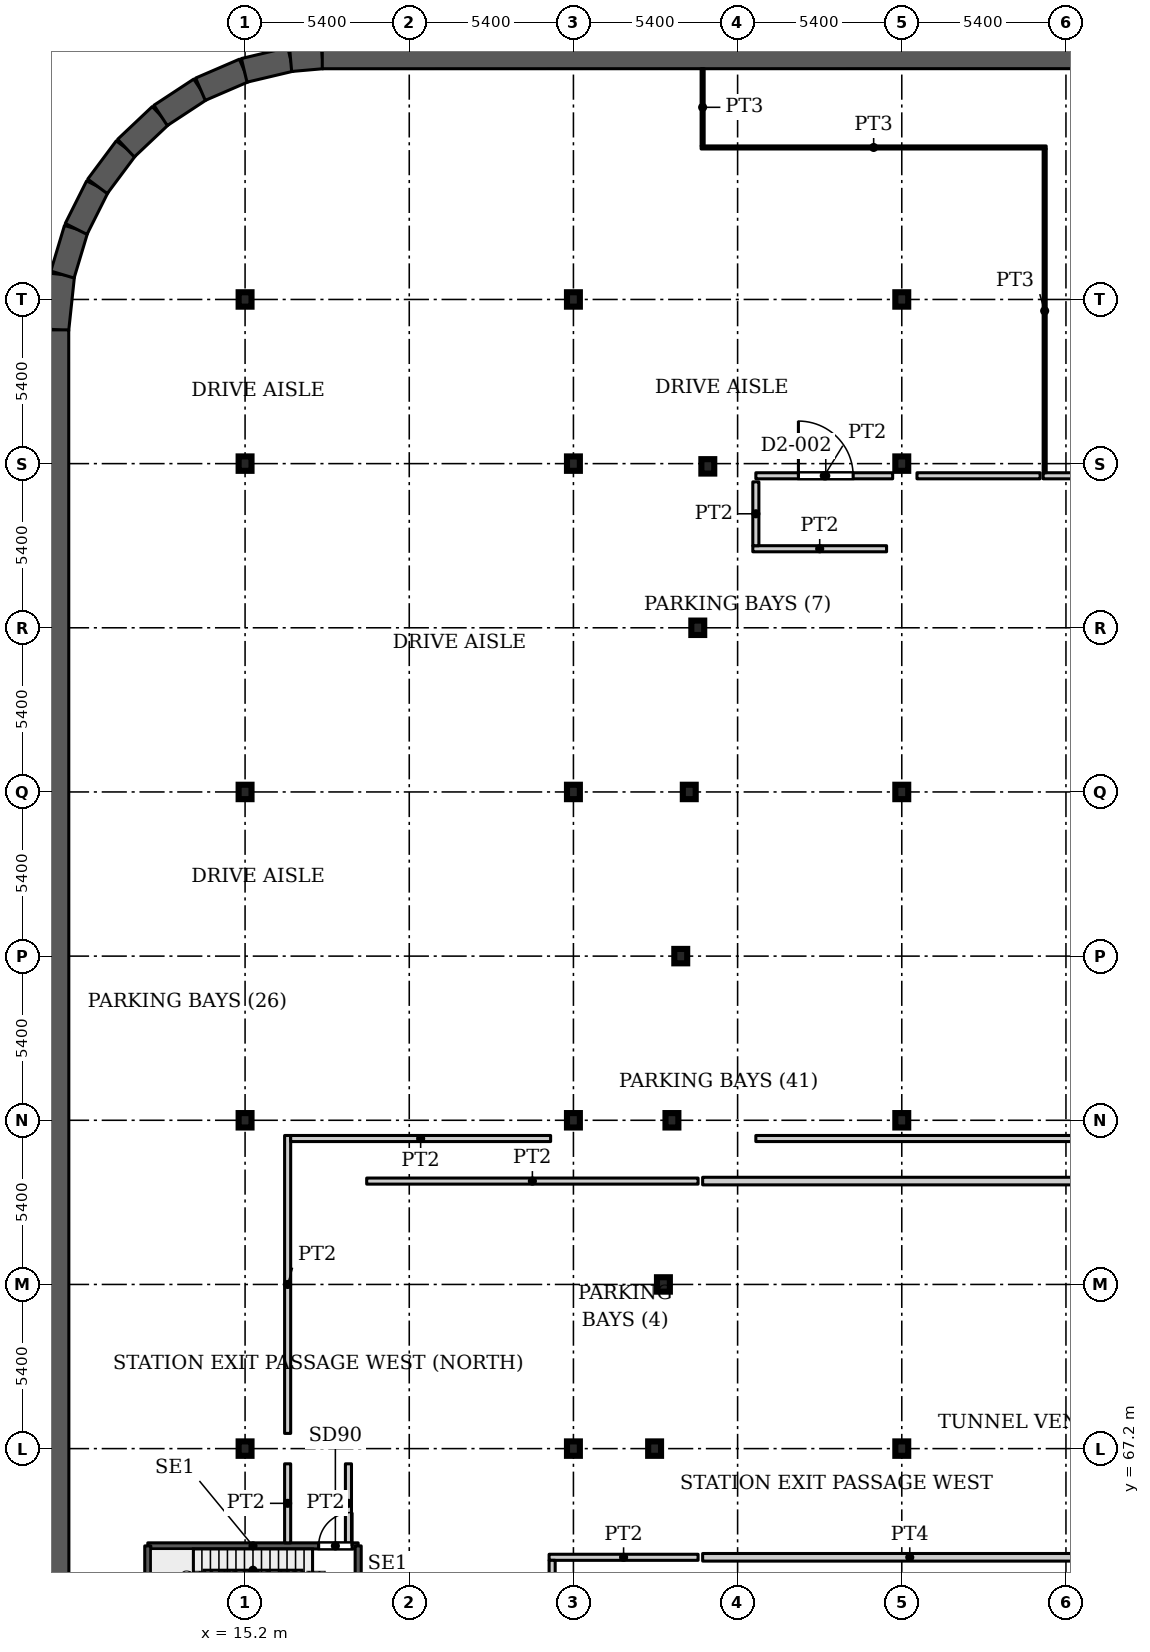
"""IFC4 building model, lengths in metres.
Left out: names, types, materials, properties, quantities, classifications, styles, units other than length and angle.
Written with IfcOpenShell. Run it as: python <this file> out.ifc"""

import sys

from ifc_helpers import new_model, si_unit, direction, frame, frame_2d, origin, origin_2d, place, context, subcontext, project, spatial, rectangle, i_section, extrude, source, transform, mapped, element, fill, save


model = new_model("IFC4")
c1 = context("Model", 3, precision=1e-05, world=origin(), true_north=direction((0.0, 1.0)))
c2 = subcontext(c1, "Body", "Model", "MODEL_VIEW")
j1 = project(units=[si_unit("LENGTHUNIT", "METRE"), si_unit("PLANEANGLEUNIT", "RADIAN")], contexts=[c1])
p1 = place(None, origin())
s1 = spatial("IfcSite", under=j1, at=p1, CompositionType="ELEMENT")
p2 = place(p1, origin())
s2 = spatial("IfcBuilding", under=s1, at=p2, CompositionType="ELEMENT")
p3 = place(p2, frame((0.0, 0.0, -10.0)))
s3 = spatial("IfcBuildingStorey", under=s2, at=p3, CompositionType="ELEMENT", Elevation=-10.0)
for number, where, z_axis, x_axis in (
    (1, (15.2, 67.2, 0.0), (0.0, 0.0, 1.0), (1.0, 0.0, 0.0)),
    (2, (26.0, 67.2, 0.0), (0.0, 0.0, 1.0), (1.0, 0.0, 0.0)),
    (3, (36.8, 67.2, 0.0), (0.0, 0.0, 1.0), (1.0, 0.0, 0.0)),
    (4, (15.2, 78.0, 0.0), (0.0, 0.0, 1.0), (1.0, 0.0, 0.0)),
    (5, (26.0, 78.0, 0.0), (0.0, 0.0, 1.0), (1.0, 0.0, 0.0)),
    (6, (36.8, 78.0, 0.0), (0.0, 0.0, 1.0), (1.0, 0.0, 0.0)),
    (7, (15.2, 88.8, 0.0), (0.0, 0.0, 1.0), (1.0, 0.0, 0.0)),
    (8, (26.0, 88.8, 0.0), (0.0, 0.0, 1.0), (1.0, 0.0, 0.0)),
    (9, (36.8, 88.8, 0.0), (0.0, 0.0, 1.0), (1.0, 0.0, 0.0)),
    (10, (15.2, 99.6, 0.0), (0.0, 0.0, 1.0), (1.0, 0.0, 0.0)),
    (11, (26.0, 99.6, 0.0), (0.0, 0.0, 1.0), (1.0, 0.0, 0.0)),
    (12, (36.8, 99.6, 0.0), (0.0, 0.0, 1.0), (1.0, 0.0, 0.0)),
    (13, (15.2, 105.0, 0.0), (0.0, 0.0, 1.0), (1.0, 0.0, 0.0)),
    (14, (26.0, 105.0, 0.0), (0.0, 0.0, 1.0), (1.0, 0.0, 0.0)),
    (15, (36.8, 105.0, 0.0), (0.0, 0.0, 1.0), (1.0, 0.0, 0.0)),
    (16, (28.67, 67.2, 0.0), (0.0, 0.0, 1.0), (1.0, 0.0, 0.0)),
    (17, (28.96, 72.6, 0.0), (0.0, 0.0, 1.0), (1.0, 0.0, 0.0)),
    (18, (29.24, 78.0, 0.0), (0.0, 0.0, 1.0), (1.0, 0.0, 0.0)),
    (19, (29.53, 83.4, 0.0), (0.0, 0.0, 1.0), (1.0, 0.0, 0.0)),
    (20, (29.81, 88.8, 0.0), (0.0, 0.0, 1.0), (1.0, 0.0, 0.0)),
    (21, (30.09, 94.2, 0.0), (0.0, 0.0, 1.0), (1.0, 0.0, 0.0)),
    (22, (30.42, 99.51, 0.0), (0.0, 0.0, 1.0), (1.0, 0.0, 0.0)),
):
    element("IfcColumn", number, at=place(p3, frame(where, z_axis=z_axis, x_axis=x_axis)), inside=s3, PredefinedType="COLUMN", context=c2, shape_type="SweptSolid", body=[
        extrude(i_section(OverallWidth=0.424, OverallDepth=0.474, WebThickness=0.048, FlangeThickness=0.077, FilletRadius=0.014, at=origin_2d()), origin(), (0.0, 0.0, 1.0), 5.0),
    ])
p4 = place(p3, frame((9.0, 104.0, 0.0), z_axis=(0.0, 0.0, 1.0), x_axis=(0.105567043429, 0.994412187849, 0.0)))
e23 = element("IfcWall", 23, at=p4, inside=s3, PredefinedType="SOLIDWALL", context=c2, shape_type="SweptSolid", body=[
    extrude(rectangle(XDim=1.829, YDim=0.8, at=frame_2d((0.915, 0.0))), origin(), (0.0, 0.0, 1.0), 5.0),
])
p5 = place(p3, frame((9.193, 105.819, 0.0), z_axis=(0.0, 0.0, 1.0), x_axis=(0.287147763375, 0.957886299092, 0.0)))
e24 = element("IfcWall", 24, at=p5, inside=s3, PredefinedType="SOLIDWALL", context=c2, shape_type="SweptSolid", body=[
    extrude(rectangle(XDim=1.567, YDim=0.8, at=frame_2d((0.783, 0.0))), origin(), (0.0, 0.0, 1.0), 5.0),
])
p6 = place(p3, frame((9.643, 107.32, 0.0), z_axis=(0.0, 0.0, 1.0), x_axis=(0.448459314462, 0.893803246399, 0.0)))
e25 = element("IfcWall", 25, at=p6, inside=s3, PredefinedType="SOLIDWALL", context=c2, shape_type="SweptSolid", body=[
    extrude(rectangle(XDim=1.567, YDim=0.8, at=frame_2d((0.784, 0.0))), origin(), (0.0, 0.0, 1.0), 5.0),
])
p7 = place(p3, frame((10.346, 108.721, 0.0), z_axis=(0.0, 0.0, 1.0), x_axis=(0.597630520512, 0.801771638905, 0.0)))
e26 = element("IfcWall", 26, at=p7, inside=s3, PredefinedType="SOLIDWALL", context=c2, shape_type="SweptSolid", body=[
    extrude(rectangle(XDim=1.568, YDim=0.8, at=frame_2d((0.784, 0.0))), origin(), (0.0, 0.0, 1.0), 5.0),
])
p8 = place(p3, frame((11.283, 109.978, 0.0), z_axis=(0.0, 0.0, 1.0), x_axis=(0.726995868662, 0.686641833089, 0.0)))
e27 = element("IfcWall", 27, at=p8, inside=s3, PredefinedType="SOLIDWALL", context=c2, shape_type="SweptSolid", body=[
    extrude(rectangle(XDim=1.567, YDim=0.8, at=frame_2d((0.783, 0.0))), origin(), (0.0, 0.0, 1.0), 5.0),
])
p9 = place(p3, frame((12.422, 111.054, 0.0), z_axis=(0.0, 0.0, 1.0), x_axis=(0.835603348101, 0.549333272834, 0.0)))
e28 = element("IfcWall", 28, at=p9, inside=s3, PredefinedType="SOLIDWALL", context=c2, shape_type="SweptSolid", body=[
    extrude(rectangle(XDim=1.568, YDim=0.8, at=frame_2d((0.784, 0.0))), origin(), (0.0, 0.0, 1.0), 5.0),
])
p10 = place(p3, frame((13.732, 111.915, 0.0), z_axis=(0.0, 0.0, 1.0), x_axis=(0.918183437355, 0.396155493925, 0.0)))
e29 = element("IfcWall", 29, at=p10, inside=s3, PredefinedType="SOLIDWALL", context=c2, shape_type="SweptSolid", body=[
    extrude(rectangle(XDim=1.567, YDim=0.8, at=frame_2d((0.784, 0.0))), origin(), (0.0, 0.0, 1.0), 5.0),
])
p11 = place(p3, frame((15.171, 112.536, 0.0), z_axis=(0.0, 0.0, 1.0), x_axis=(0.972992949439, 0.230834833469, 0.0)))
e30 = element("IfcWall", 30, at=p11, inside=s3, PredefinedType="SOLIDWALL", context=c2, shape_type="SweptSolid", body=[
    extrude(rectangle(XDim=1.569, YDim=0.8, at=frame_2d((0.784, 0.0))), origin(), (0.0, 0.0, 1.0), 5.0),
])
p12 = place(p3, frame((16.697, 112.898, 0.0), z_axis=(0.0, 0.0, 1.0), x_axis=(0.996202832813, 0.087062712427, 0.0)))
e31 = element("IfcWall", 31, at=p12, inside=s3, PredefinedType="SOLIDWALL", context=c2, shape_type="SweptSolid", body=[
    extrude(rectangle(XDim=1.046, YDim=0.8, at=frame_2d((0.523, 0.0))), origin(), (0.0, 0.0, 1.0), 5.0),
])
p13 = place(p3, frame((17.739, 112.989, 0.0), z_axis=(0.0, 0.0, 1.0), x_axis=(0.999999994851, 0.000101480029, 0.0)))
e32 = element("IfcWall", 32, at=p13, inside=s3, PredefinedType="SOLIDWALL", context=c2, shape_type="SweptSolid", body=[
    extrude(rectangle(XDim=108.261, YDim=0.8, at=frame_2d((54.13, 0.0))), origin(), (0.0, 0.0, 1.0), 5.0),
])
p14 = place(p3, frame((9.011, 15.739, 0.0), z_axis=(0.0, 0.0, 1.0), x_axis=(-0.000124475473, 0.999999992253, 0.0)))
e33 = element("IfcWall", 33, at=p14, inside=s3, PredefinedType="SOLIDWALL", context=c2, shape_type="SweptSolid", body=[
    extrude(rectangle(XDim=88.261, YDim=0.8, at=frame_2d((44.13, 0.0))), origin(), (0.0, 0.0, 1.0), 5.0),
])
p15 = place(p3, frame((12.0, 64.0, 0.0), z_axis=(0.0, 0.0, 1.0), x_axis=(1.0, 0.0, 0.0)))
e34 = element("IfcWall", 34, at=p15, inside=s3, PredefinedType="SHEAR", context=c2, shape_type="SweptSolid", body=[
    extrude(rectangle(XDim=6.92, YDim=0.2, at=frame_2d((3.46, 0.0))), origin(), (0.0, 0.0, 1.0), 5.0),
])
p16 = place(p15, frame((5.62, 0.0, 0.0)))
e35 = element("IfcOpeningElement", 35, at=p16, cuts=e34, PredefinedType="OPENING", context=c2, shape_type="SweptSolid", body=[
    extrude(rectangle(XDim=1.1, YDim=2.2, at=frame_2d((0.55, 1.1))), frame((0.0, 0.11, 0.0), z_axis=(0.0, -1.0, 0.0), x_axis=(1.0, 0.0, 0.0)), (0.0, 0.0, 1.0), 0.22),
])
for number, where, z_axis, x_axis in (
    (36, (12.0, 60.85, 0.0), (0.0, 0.0, 1.0), (0.0, 1.0, 0.0)),
    (37, (18.92, 60.85, 0.0), (0.0, 0.0, 1.0), (0.0, 1.0, 0.0)),
):
    element("IfcWall", number, at=place(p3, frame(where, z_axis=z_axis, x_axis=x_axis)), inside=s3, PredefinedType="SHEAR", context=c2, shape_type="SweptSolid", body=[
        extrude(rectangle(XDim=3.15, YDim=0.2, at=frame_2d((1.575, 0.0))), origin(), (0.0, 0.0, 1.0), 5.0),
    ])
p17 = place(p3, frame((16.6, 64.1, 0.0), z_axis=(0.0, 0.0, 1.0), x_axis=(0.0, 1.0, 0.0)))
e38 = element("IfcWall", 38, at=p17, inside=s3, PredefinedType="PARTITIONING", context=c2, shape_type="SweptSolid", body=[
    extrude(rectangle(XDim=2.6, YDim=0.2, at=frame_2d((1.3, 0.0))), origin(), (0.0, 0.0, 1.0), 4.58),
])
p18 = place(p3, frame((16.6, 67.7, 0.0), z_axis=(0.0, 0.0, 1.0), x_axis=(0.0, 1.0, 0.0)))
e39 = element("IfcWall", 39, at=p18, inside=s3, PredefinedType="PARTITIONING", context=c2, shape_type="SweptSolid", body=[
    extrude(rectangle(XDim=9.8, YDim=0.2, at=frame_2d((4.9, 0.0))), origin(), (0.0, 0.0, 1.0), 4.58),
])
p19 = place(p3, frame((16.7, 77.4, 0.0), z_axis=(0.0, 0.0, 1.0), x_axis=(1.0, 0.0, 0.0)))
e40 = element("IfcWall", 40, at=p19, inside=s3, PredefinedType="PARTITIONING", context=c2, shape_type="SweptSolid", body=[
    extrude(rectangle(XDim=8.55, YDim=0.2, at=frame_2d((4.275, 0.0))), origin(), (0.0, 0.0, 1.0), 4.58),
])
p20 = place(p3, frame((18.6, 64.1, 0.0), z_axis=(0.0, 0.0, 1.0), x_axis=(0.0, 1.0, 0.0)))
e41 = element("IfcWall", 41, at=p20, inside=s3, PredefinedType="PARTITIONING", context=c2, shape_type="SweptSolid", body=[
    extrude(rectangle(XDim=2.6, YDim=0.2, at=frame_2d((1.3, 0.0))), origin(), (0.0, 0.0, 1.0), 4.58),
])
p21 = place(p3, frame((19.2, 76.0, 0.0), z_axis=(0.0, 0.0, 1.0), x_axis=(1.0, 0.0, 0.0)))
e42 = element("IfcWall", 42, at=p21, inside=s3, PredefinedType="PARTITIONING", context=c2, shape_type="SweptSolid", body=[
    extrude(rectangle(XDim=10.9, YDim=0.2, at=frame_2d((5.45, 0.0))), origin(), (0.0, 0.0, 1.0), 4.58),
])
p22 = place(p3, frame((25.2, 63.625, 0.0), z_axis=(0.0, 0.0, 1.0), x_axis=(1.0, 0.0, 0.0)))
e43 = element("IfcWall", 43, at=p22, inside=s3, PredefinedType="PARTITIONING", context=c2, shape_type="SweptSolid", body=[
    extrude(rectangle(XDim=4.9, YDim=0.2, at=frame_2d((2.45, 0.0))), origin(), (0.0, 0.0, 1.0), 4.58),
])
p23 = place(p3, frame((25.3, 61.325, 0.0), z_axis=(0.0, 0.0, 1.0), x_axis=(0.0, 1.0, 0.0)))
e44 = element("IfcWall", 44, at=p23, inside=s3, PredefinedType="PARTITIONING", context=c2, shape_type="SweptSolid", body=[
    extrude(rectangle(XDim=2.2, YDim=0.2, at=frame_2d((1.1, 0.0))), origin(), (0.0, 0.0, 1.0), 4.58),
])
p24 = place(p3, frame((30.2, 110.0, 0.0), z_axis=(0.0, 0.0, 1.0), x_axis=(1.0, 0.0, 0.0)))
e45 = element("IfcWall", 45, at=p24, inside=s3, PredefinedType="PARTITIONING", context=c2, shape_type="SweptSolid", body=[
    extrude(rectangle(XDim=11.35, YDim=0.1, at=frame_2d((5.675, 0.0))), origin(), (0.0, 0.0, 1.0), 4.58),
])
p25 = place(p3, frame((30.25, 63.625, 0.0), z_axis=(0.0, 0.0, 1.0), x_axis=(1.0, 0.0, 0.0)))
e46 = element("IfcWall", 46, at=p25, inside=s3, PredefinedType="PARTITIONING", context=c2, shape_type="SweptSolid", body=[
    extrude(rectangle(XDim=13.625, YDim=0.25, at=frame_2d((6.812, 0.0))), origin(), (0.0, 0.0, 1.0), 4.58),
])
p26 = place(p3, frame((30.25, 76.0, 0.0), z_axis=(0.0, 0.0, 1.0), x_axis=(1.0, 0.0, 0.0)))
e47 = element("IfcWall", 47, at=p26, inside=s3, PredefinedType="PARTITIONING", context=c2, shape_type="SweptSolid", body=[
    extrude(rectangle(XDim=25.75, YDim=0.25, at=frame_2d((12.875, 0.0))), origin(), (0.0, 0.0, 1.0), 4.58),
])
p27 = place(p3, frame((30.25, 110.05, 0.0), z_axis=(0.0, 0.0, 1.0), x_axis=(0.0, 1.0, 0.0)))
e48 = element("IfcWall", 48, at=p27, inside=s3, PredefinedType="PARTITIONING", context=c2, shape_type="SweptSolid", body=[
    extrude(rectangle(XDim=2.541, YDim=0.1, at=frame_2d((1.271, 0.0))), origin(), (0.0, 0.0, 1.0), 4.58),
])
p28 = place(p3, frame((31.9, 96.8, 0.0), z_axis=(0.0, 0.0, 1.0), x_axis=(1.0, 0.0, 0.0)))
e49 = element("IfcWall", 49, at=p28, inside=s3, PredefinedType="PARTITIONING", context=c2, shape_type="SweptSolid", body=[
    extrude(rectangle(XDim=4.4, YDim=0.2, at=frame_2d((2.2, 0.0))), origin(), (0.0, 0.0, 1.0), 4.58),
])
p29 = place(p3, frame((32.0, 77.4, 0.0), z_axis=(0.0, 0.0, 1.0), x_axis=(1.0, 0.0, 0.0)))
e50 = element("IfcWall", 50, at=p29, inside=s3, PredefinedType="PARTITIONING", context=c2, shape_type="SweptSolid", body=[
    extrude(rectangle(XDim=38.1, YDim=0.2, at=frame_2d((19.05, 0.0))), origin(), (0.0, 0.0, 1.0), 4.58),
])
p30 = place(p3, frame((32.0, 96.9, 0.0), z_axis=(0.0, 0.0, 1.0), x_axis=(0.0, 1.0, 0.0)))
e51 = element("IfcWall", 51, at=p30, inside=s3, PredefinedType="PARTITIONING", context=c2, shape_type="SweptSolid", body=[
    extrude(rectangle(XDim=2.1, YDim=0.2, at=frame_2d((1.05, 0.0))), origin(), (0.0, 0.0, 1.0), 4.58),
])
p31 = place(p3, frame((32.0, 99.2, 0.0), z_axis=(0.0, 0.0, 1.0), x_axis=(1.0, 0.0, 0.0)))
e52 = element("IfcWall", 52, at=p31, inside=s3, PredefinedType="PARTITIONING", context=c2, shape_type="SweptSolid", body=[
    extrude(rectangle(XDim=4.5, YDim=0.2, at=frame_2d((2.25, 0.0))), origin(), (0.0, 0.0, 1.0), 4.58),
])
p32 = place(p31, frame((1.4, 0.0, 0.0)))
e53 = element("IfcOpeningElement", 53, at=p32, cuts=e52, PredefinedType="OPENING", context=c2, shape_type="SweptSolid", body=[
    extrude(rectangle(XDim=1.8, YDim=2.1, at=frame_2d((0.9, 1.05))), frame((0.0, 0.11, 0.0), z_axis=(0.0, -1.0, 0.0), x_axis=(1.0, 0.0, 0.0)), (0.0, 0.0, 1.0), 0.22),
])
p33 = place(p3, frame((37.3, 99.2, 0.0), z_axis=(0.0, 0.0, 1.0), x_axis=(1.0, 0.0, 0.0)))
e54 = element("IfcWall", 54, at=p33, inside=s3, PredefinedType="PARTITIONING", context=c2, shape_type="SweptSolid", body=[
    extrude(rectangle(XDim=4.05, YDim=0.2, at=frame_2d((2.025, 0.0))), origin(), (0.0, 0.0, 1.0), 4.58),
])
p34 = place(p3, frame((41.45, 99.2, 0.0), z_axis=(0.0, 0.0, 1.0), x_axis=(1.0, 0.0, 0.0)))
e55 = element("IfcWall", 55, at=p34, inside=s3, PredefinedType="PARTITIONING", context=c2, shape_type="SweptSolid", body=[
    extrude(rectangle(XDim=4.55, YDim=0.2, at=frame_2d((2.275, 0.0))), origin(), (0.0, 0.0, 1.0), 4.58),
])
p35 = place(p34, frame((1.9, 0.0, 0.0)))
e56 = element("IfcOpeningElement", 56, at=p35, cuts=e55, PredefinedType="OPENING", context=c2, shape_type="SweptSolid", body=[
    extrude(rectangle(XDim=1.0, YDim=2.1, at=frame_2d((0.5, 1.05))), frame((0.0, 0.11, 0.0), z_axis=(0.0, -1.0, 0.0), x_axis=(1.0, 0.0, 0.0)), (0.0, 0.0, 1.0), 0.22),
])
p36 = place(p3, frame((41.5, 99.3, 0.0), z_axis=(0.0, 0.0, 1.0), x_axis=(0.0, 1.0, 0.0)))
e57 = element("IfcWall", 57, at=p36, inside=s3, PredefinedType="PARTITIONING", context=c2, shape_type="SweptSolid", body=[
    extrude(rectangle(XDim=10.65, YDim=0.1, at=frame_2d((5.325, 0.0))), origin(), (0.0, 0.0, 1.0), 4.58),
])
m1 = source(origin(), c2, "Body", "SweptSolid", [
    extrude(rectangle(XDim=1.1, YDim=2.2, at=frame_2d((0.55, 1.1))), frame((0.0, 0.025, 0.0), z_axis=(0.0, -1.0, 0.0), x_axis=(1.0, 0.0, 0.0)), (0.0, 0.0, 1.0), 0.05),
])
p37 = place(p16, origin())
e58 = element("IfcDoor", 58, at=p37, inside=s3, OperationType="SINGLE_SWING_LEFT", PredefinedType="DOOR", context=c2, shape_type="MappedRepresentation", body=[
    mapped(m1, transform((0.0, 0.0, 0.0), x_axis=(1.0, 0.0, 0.0), y_axis=(0.0, 1.0, 0.0), z_axis=(0.0, 0.0, 1.0), scale=1.0)),
])
fill(e35, e58)
m2 = source(origin(), c2, "Body", "SweptSolid", [
    extrude(rectangle(XDim=1.8, YDim=2.1, at=frame_2d((0.9, 1.05))), frame((0.0, 0.025, 0.0), z_axis=(0.0, -1.0, 0.0), x_axis=(1.0, 0.0, 0.0)), (0.0, 0.0, 1.0), 0.05),
])
p38 = place(p32, origin())
e59 = element("IfcDoor", 59, at=p38, inside=s3, OperationType="DOUBLE_DOOR_SINGLE_SWING", PredefinedType="DOOR", context=c2, shape_type="MappedRepresentation", body=[
    mapped(m2, transform((0.0, 0.0, 0.0), x_axis=(1.0, 0.0, 0.0), y_axis=(0.0, 1.0, 0.0), z_axis=(0.0, 0.0, 1.0), scale=1.0)),
])
fill(e53, e59)
save(model, sys.argv[1])
